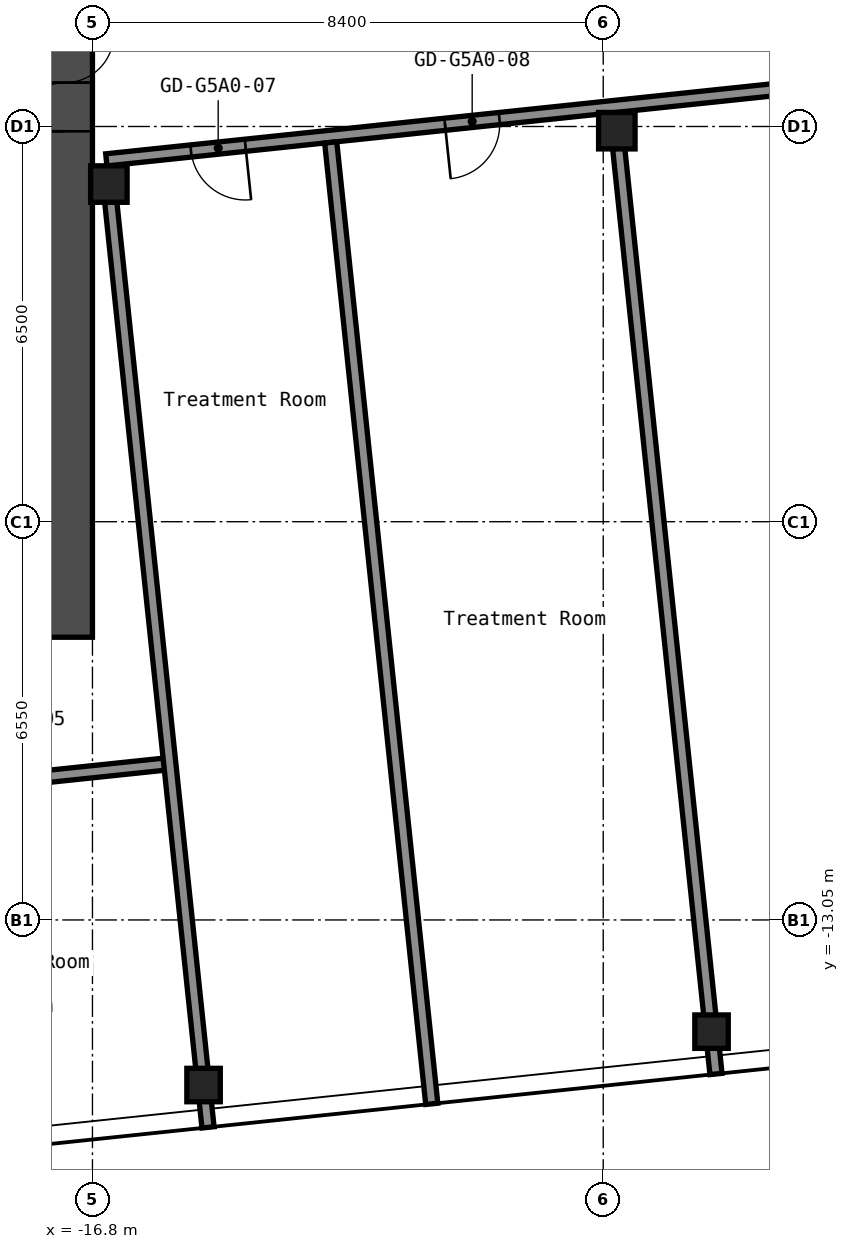
"""IFC4 building model, lengths in metres.
Left out: names, types, materials, properties, quantities, classifications, styles, units other than length and angle.
Written with IfcOpenShell. Run it as: python <this file> out.ifc"""

import sys

from ifc_helpers import new_model, si_unit, direction, frame, frame_2d, origin, origin_2d, place, context, subcontext, project, spatial, rectangle, hollow_rectangle, extrude, element, fill, save


model = new_model("IFC4")
c1 = context("Model", 3, precision=1e-05, world=origin(), true_north=direction((0.0, 1.0)))
c2 = subcontext(c1, "Body", "Model", "MODEL_VIEW")
j1 = project(units=[si_unit("LENGTHUNIT", "METRE"), si_unit("PLANEANGLEUNIT", "RADIAN")], contexts=[c1])
p1 = place(None, origin())
s1 = spatial("IfcSite", under=j1, at=p1, CompositionType="ELEMENT")
p2 = place(p1, origin())
s2 = spatial("IfcBuilding", under=s1, at=p2, CompositionType="ELEMENT")
p3 = place(p2, frame((0.0, 0.0, 239.0)))
s3 = spatial("IfcBuildingStorey", under=s2, at=p3, CompositionType="ELEMENT", Elevation=239.0)
p4 = place(p3, frame((-14.973, -15.765, 0.0), z_axis=(0.0, 0.0, 1.0), x_axis=(1.0, 0.0, 0.0)))
e1 = element("IfcColumn", 1, at=p4, inside=s3, PredefinedType="COLUMN", context=c2, shape_type="SweptSolid", body=[
    extrude(hollow_rectangle(XDim=0.55, YDim=0.55, WallThickness=0.022, InnerFilletRadius=0.033, OuterFilletRadius=0.055, at=origin_2d()), origin(), (0.0, 0.0, 1.0), 2.75),
])
p5 = place(p3, frame((-16.53, -0.947, 0.0), z_axis=(0.0, 0.0, 1.0), x_axis=(1.0, 0.0, 0.0)))
e2 = element("IfcColumn", 2, at=p5, inside=s3, PredefinedType="COLUMN", context=c2, shape_type="SweptSolid", body=[
    extrude(hollow_rectangle(XDim=0.6, YDim=0.6, WallThickness=0.025, InnerFilletRadius=0.038, OuterFilletRadius=0.062, at=origin_2d()), origin(), (0.0, 0.0, 1.0), 2.75),
])
p6 = place(p3, frame((-6.619, -14.887, 0.0), z_axis=(0.0, 0.0, 1.0), x_axis=(1.0, 0.0, 0.0)))
e3 = element("IfcColumn", 3, at=p6, inside=s3, PredefinedType="COLUMN", context=c2, shape_type="SweptSolid", body=[
    extrude(hollow_rectangle(XDim=0.55, YDim=0.55, WallThickness=0.022, InnerFilletRadius=0.033, OuterFilletRadius=0.055, at=origin_2d()), origin(), (0.0, 0.0, 1.0), 2.75),
])
p7 = place(p3, frame((-8.176, -0.069, 0.0), z_axis=(0.0, 0.0, 1.0), x_axis=(1.0, 0.0, 0.0)))
e4 = element("IfcColumn", 4, at=p7, inside=s3, PredefinedType="COLUMN", context=c2, shape_type="SweptSolid", body=[
    extrude(hollow_rectangle(XDim=0.6, YDim=0.6, WallThickness=0.025, InnerFilletRadius=0.038, OuterFilletRadius=0.062, at=origin_2d()), origin(), (0.0, 0.0, 1.0), 2.75),
])
p8 = place(p3, frame((-17.25, -8.4, 0.0), z_axis=(0.0, 0.0, 1.0), x_axis=(0.0, 1.0, 0.0)))
e5 = element("IfcWall", 5, at=p8, inside=s3, PredefinedType="SHEAR", context=c2, shape_type="SweptSolid", body=[
    extrude(rectangle(XDim=16.8, YDim=0.9, at=frame_2d((8.4, 0.0))), origin(), (0.0, 0.0, 1.0), 2.75),
])
p9 = place(p8, frame((8.321, 0.0, 0.0)))
e6 = element("IfcOpeningElement", 6, at=p9, cuts=e5, PredefinedType="OPENING", context=c2, shape_type="SweptSolid", body=[
    extrude(rectangle(XDim=1.6, YDim=2.1, at=frame_2d((0.8, 1.05))), frame((0.0, 0.46, 0.0), z_axis=(0.0, -1.0, 0.0), x_axis=(1.0, 0.0, 0.0)), (0.0, 0.0, 1.0), 0.92),
])
p10 = place(p3, frame((-36.712, -12.705, 0.0), z_axis=(0.0, 0.0, 1.0), x_axis=(0.994522460242, 0.104523088709, 0.0)))
e7 = element("IfcWall", 7, at=p10, inside=s3, PredefinedType="PARTITIONING", context=c2, shape_type="SweptSolid", body=[
    extrude(rectangle(XDim=21.3, YDim=0.2, at=frame_2d((10.65, 0.0))), origin(), (0.0, 0.0, 1.0), 2.75),
])
p11 = place(p10, frame((3.05, 0.0, 0.0)))
e8 = element("IfcOpeningElement", 8, at=p11, cuts=e7, PredefinedType="OPENING", context=c2, shape_type="SweptSolid", body=[
    extrude(rectangle(XDim=1.0, YDim=2.1, at=frame_2d((0.5, 1.05))), frame((0.0, 0.11, 0.0), z_axis=(0.0, -1.0, 0.0), x_axis=(1.0, 0.0, 0.0)), (0.0, 0.0, 1.0), 0.22),
])
p12 = place(p10, frame((5.645, 0.0, 0.0)))
e9 = element("IfcOpeningElement", 9, at=p12, cuts=e7, PredefinedType="OPENING", context=c2, shape_type="SweptSolid", body=[
    extrude(rectangle(XDim=0.9, YDim=2.1, at=frame_2d((0.45, 1.05))), frame((0.0, 0.11, 0.0), z_axis=(0.0, -1.0, 0.0), x_axis=(1.0, 0.0, 0.0)), (0.0, 0.0, 1.0), 0.22),
])
p13 = place(p10, frame((9.845, 0.0, 0.0)))
e10 = element("IfcOpeningElement", 10, at=p13, cuts=e7, PredefinedType="OPENING", context=c2, shape_type="SweptSolid", body=[
    extrude(rectangle(XDim=0.9, YDim=2.1, at=frame_2d((0.45, 1.05))), frame((0.0, 0.11, 0.0), z_axis=(0.0, -1.0, 0.0), x_axis=(1.0, 0.0, 0.0)), (0.0, 0.0, 1.0), 0.22),
])
p14 = place(p10, frame((13.96, 0.0, 0.0)))
e11 = element("IfcOpeningElement", 11, at=p14, cuts=e7, PredefinedType="OPENING", context=c2, shape_type="SweptSolid", body=[
    extrude(rectangle(XDim=0.9, YDim=2.1, at=frame_2d((0.45, 1.05))), frame((0.0, 0.11, 0.0), z_axis=(0.0, -1.0, 0.0), x_axis=(1.0, 0.0, 0.0)), (0.0, 0.0, 1.0), 0.22),
])
p15 = place(p10, frame((18.16, 0.0, 0.0)))
e12 = element("IfcOpeningElement", 12, at=p15, cuts=e7, PredefinedType="OPENING", context=c2, shape_type="SweptSolid", body=[
    extrude(rectangle(XDim=0.9, YDim=2.1, at=frame_2d((0.45, 1.05))), frame((0.0, 0.11, 0.0), z_axis=(0.0, -1.0, 0.0), x_axis=(1.0, 0.0, 0.0)), (0.0, 0.0, 1.0), 0.22),
])
p16 = place(p3, frame((-16.572, -0.549, 0.0), z_axis=(0.0, 0.0, 1.0), x_axis=(0.994521146831, 0.104535584879, 0.0)))
e13 = element("IfcWall", 13, at=p16, inside=s3, PredefinedType="PARTITIONING", context=c2, shape_type="SweptSolid", body=[
    extrude(rectangle(XDim=33.561, YDim=0.2, at=frame_2d((16.78, 0.0))), origin(), (0.0, 0.0, 1.0), 2.75),
])
p17 = place(p16, frame((1.4, 0.0, 0.0)))
e14 = element("IfcOpeningElement", 14, at=p17, cuts=e13, PredefinedType="OPENING", context=c2, shape_type="SweptSolid", body=[
    extrude(rectangle(XDim=0.9, YDim=2.1, at=frame_2d((0.45, 1.05))), frame((0.0, 0.11, 0.0), z_axis=(0.0, -1.0, 0.0), x_axis=(1.0, 0.0, 0.0)), (0.0, 0.0, 1.0), 0.22),
])
p18 = place(p16, frame((5.6, 0.0, 0.0)))
e15 = element("IfcOpeningElement", 15, at=p18, cuts=e13, PredefinedType="OPENING", context=c2, shape_type="SweptSolid", body=[
    extrude(rectangle(XDim=0.9, YDim=2.1, at=frame_2d((0.45, 1.05))), frame((0.0, 0.11, 0.0), z_axis=(0.0, -1.0, 0.0), x_axis=(1.0, 0.0, 0.0)), (0.0, 0.0, 1.0), 0.22),
])
p19 = place(p16, frame((12.1, 0.0, 0.0)))
e16 = element("IfcOpeningElement", 16, at=p19, cuts=e13, PredefinedType="OPENING", context=c2, shape_type="SweptSolid", body=[
    extrude(rectangle(XDim=1.0, YDim=2.1, at=frame_2d((0.5, 1.05))), frame((0.0, 0.11, 0.0), z_axis=(0.0, -1.0, 0.0), x_axis=(1.0, 0.0, 0.0)), (0.0, 0.0, 1.0), 0.22),
])
p20 = place(p16, frame((18.8, 0.0, 0.0)))
e17 = element("IfcOpeningElement", 17, at=p20, cuts=e13, PredefinedType="OPENING", context=c2, shape_type="SweptSolid", body=[
    extrude(rectangle(XDim=1.0, YDim=2.1, at=frame_2d((0.5, 1.05))), frame((0.0, 0.11, 0.0), z_axis=(0.0, -1.0, 0.0), x_axis=(1.0, 0.0, 0.0)), (0.0, 0.0, 1.0), 0.22),
])
p21 = place(p16, frame((29.4, 0.0, 0.0)))
e18 = element("IfcOpeningElement", 18, at=p21, cuts=e13, PredefinedType="OPENING", context=c2, shape_type="SweptSolid", body=[
    extrude(rectangle(XDim=1.6, YDim=2.1, at=frame_2d((0.8, 1.05))), frame((0.0, 0.11, 0.0), z_axis=(0.0, -1.0, 0.0), x_axis=(1.0, 0.0, 0.0)), (0.0, 0.0, 1.0), 0.22),
])
p22 = place(p3, frame((-14.9, -16.461, 0.0), z_axis=(0.0, 0.0, 1.0), x_axis=(-0.104523729364, 0.99452239291, 0.0)))
e19 = element("IfcWall", 19, at=p22, inside=s3, PredefinedType="PARTITIONING", context=c2, shape_type="SweptSolid", body=[
    extrude(rectangle(XDim=15.308, YDim=0.2, at=frame_2d((7.654, 0.0))), origin(), (0.0, 0.0, 1.0), 2.75),
])
p23 = place(p3, frame((-11.22, -16.074, 0.0), z_axis=(0.0, 0.0, 1.0), x_axis=(-0.104520927191, 0.994522687413, 0.0)))
e20 = element("IfcWall", 20, at=p23, inside=s3, PredefinedType="PARTITIONING", context=c2, shape_type="SweptSolid", body=[
    extrude(rectangle(XDim=15.9, YDim=0.2, at=frame_2d((7.95, 0.0))), origin(), (0.0, 0.0, 1.0), 2.75),
])
p24 = place(p3, frame((-6.546, -15.583, 0.0), z_axis=(0.0, 0.0, 1.0), x_axis=(-0.104523729364, 0.99452239291, 0.0)))
e21 = element("IfcWall", 21, at=p24, inside=s3, PredefinedType="PARTITIONING", context=c2, shape_type="SweptSolid", body=[
    extrude(rectangle(XDim=15.308, YDim=0.2, at=frame_2d((7.654, 0.0))), origin(), (0.0, 0.0, 1.0), 2.75),
])
p25 = place(p9, origin())
e22 = element("IfcDoor", 22, at=p25, inside=s3, OperationType="DOUBLE_DOOR_SINGLE_SWING", PredefinedType="DOOR", context=c2, shape_type="SweptSolid", body=[
    extrude(rectangle(XDim=1.6, YDim=2.1, at=frame_2d((0.8, 1.05))), frame((0.0, 0.025, 0.0), z_axis=(0.0, -1.0, 0.0), x_axis=(1.0, 0.0, 0.0)), (0.0, 0.0, 1.0), 0.05),
])
fill(e6, e22)
p26 = place(p17, origin())
e23 = element("IfcDoor", 23, at=p26, inside=s3, OperationType="SINGLE_SWING_RIGHT", PredefinedType="DOOR", context=c2, shape_type="SweptSolid", body=[
    extrude(rectangle(XDim=0.9, YDim=2.1, at=frame_2d((0.45, 1.05))), frame((0.0, 0.025, 0.0), z_axis=(0.0, -1.0, 0.0), x_axis=(1.0, 0.0, 0.0)), (0.0, 0.0, 1.0), 0.05),
])
fill(e14, e23)
p27 = place(p18, origin())
e24 = element("IfcDoor", 24, at=p27, inside=s3, OperationType="SINGLE_SWING_LEFT", PredefinedType="DOOR", context=c2, shape_type="SweptSolid", body=[
    extrude(rectangle(XDim=0.9, YDim=2.1, at=frame_2d((0.45, 1.05))), frame((0.0, 0.025, 0.0), z_axis=(0.0, -1.0, 0.0), x_axis=(1.0, 0.0, 0.0)), (0.0, 0.0, 1.0), 0.05),
])
fill(e15, e24)
save(model, sys.argv[1])
